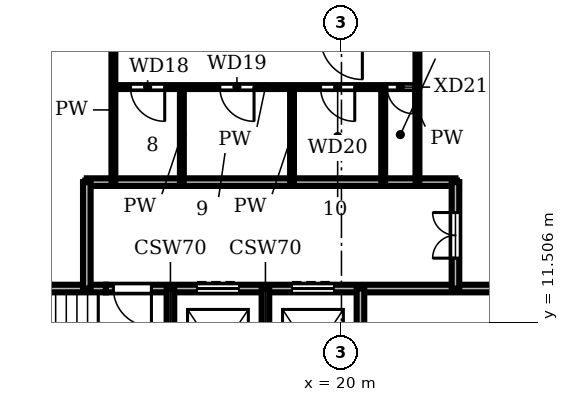
"""IFC4 building model, lengths in metres.
Left out: names, types, materials, properties, quantities, classifications, styles, units other than length and angle.
Written with IfcOpenShell. Run it as: python <this file> out.ifc"""

import sys

from ifc_helpers import new_model, si_unit, direction, frame, frame_2d, origin, place, context, subcontext, project, spatial, rectangle, extrude, element, fill, save


model = new_model("IFC4")
c1 = context("Model", 3, precision=1e-05, world=origin(), true_north=direction((0.0, 1.0)))
c2 = subcontext(c1, "Body", "Model", "MODEL_VIEW")
j1 = project(units=[si_unit("LENGTHUNIT", "METRE"), si_unit("PLANEANGLEUNIT", "RADIAN")], contexts=[c1])
p1 = place(None, origin())
s1 = spatial("IfcSite", under=j1, at=p1, CompositionType="ELEMENT")
p2 = place(p1, origin())
s2 = spatial("IfcBuilding", under=s1, at=p2, CompositionType="ELEMENT")
p3 = place(p2, frame((0.0, 0.0, 166.8)))
s3 = spatial("IfcBuildingStorey", under=s2, at=p3, CompositionType="ELEMENT", Elevation=166.8)
p4 = place(p3, frame((8.7, 12.4, 0.0), z_axis=(0.0, 0.0, 1.0), x_axis=(1.0, 0.0, 0.0)))
e1 = element("IfcWall", 1, at=p4, inside=s3, PredefinedType="SHEAR", context=c2, shape_type="SweptSolid", body=[
    extrude(rectangle(XDim=5.1, YDim=0.2, at=frame_2d((2.55, 0.0))), origin(), (0.0, 0.0, 1.0), 3.58),
])
p5 = place(p3, frame((13.8, 12.4, 0.0), z_axis=(0.0, 0.0, 1.0), x_axis=(1.0, 0.0, 0.0)))
e2 = element("IfcWall", 2, at=p5, inside=s3, PredefinedType="SHEAR", context=c2, shape_type="SweptSolid", body=[
    extrude(rectangle(XDim=13.5, YDim=0.2, at=frame_2d((6.75, 0.0))), origin(), (0.0, 0.0, 1.0), 3.58),
])
p6 = place(p5, frame((2.4, 0.0, 0.0)))
e3 = element("IfcOpeningElement", 3, at=p6, cuts=e2, PredefinedType="OPENING", context=c2, shape_type="SweptSolid", body=[
    extrude(rectangle(XDim=1.1, YDim=2.1, at=frame_2d((0.55, 1.05))), frame((0.0, 0.11, 0.0), z_axis=(0.0, -1.0, 0.0), x_axis=(1.0, 0.0, 0.0)), (0.0, 0.0, 1.0), 0.22),
])
p7 = place(p5, frame((4.9, 0.0, 0.0)))
e4 = element("IfcOpeningElement", 4, at=p7, cuts=e2, PredefinedType="OPENING", context=c2, shape_type="SweptSolid", body=[
    extrude(rectangle(XDim=1.1, YDim=2.1, at=frame_2d((0.55, 1.05))), frame((0.0, 0.11, 0.0), z_axis=(0.0, -1.0, 0.0), x_axis=(1.0, 0.0, 0.0)), (0.0, 0.0, 1.0), 0.22),
])
p8 = place(p5, frame((0.2, 0.0, 0.0)))
e5 = element("IfcOpeningElement", 5, at=p8, cuts=e2, PredefinedType="OPENING", context=c2, shape_type="SweptSolid", body=[
    extrude(rectangle(XDim=1.0, YDim=2.1, at=frame_2d((0.5, 1.05))), frame((0.0, 0.11, 0.0), z_axis=(0.0, -1.0, 0.0), x_axis=(1.0, 0.0, 0.0)), (0.0, 0.0, 1.0), 0.22),
])
p9 = place(p3, frame((13.3, 15.2, 0.0), z_axis=(0.0, 0.0, 1.0), x_axis=(1.0, 0.0, 0.0)))
e6 = element("IfcWall", 6, at=p9, inside=s3, PredefinedType="SHEAR", context=c2, shape_type="SweptSolid", body=[
    extrude(rectangle(XDim=9.7, YDim=0.2, at=frame_2d((4.85, 0.0))), origin(), (0.0, 0.0, 1.0), 3.58),
])
p10 = place(p3, frame((14.0, 17.7, 0.0), z_axis=(0.0, 0.0, 1.0), x_axis=(1.0, 0.0, 0.0)))
e7 = element("IfcWall", 7, at=p10, inside=s3, PredefinedType="PARTITIONING", context=c2, shape_type="SweptSolid", body=[
    extrude(rectangle(XDim=8.0, YDim=0.1, at=frame_2d((4.0, 0.0))), origin(), (0.0, 0.0, 1.0), 3.58),
])
p11 = place(p10, frame((0.45, 0.0, 0.0)))
e8 = element("IfcOpeningElement", 8, at=p11, cuts=e7, PredefinedType="OPENING", context=c2, shape_type="SweptSolid", body=[
    extrude(rectangle(XDim=0.9, YDim=2.1, at=frame_2d((0.45, 1.05))), frame((0.0, 0.06, 0.0), z_axis=(0.0, -1.0, 0.0), x_axis=(1.0, 0.0, 0.0)), (0.0, 0.0, 1.0), 0.12),
])
p12 = place(p10, frame((2.8, 0.0, 0.0)))
e9 = element("IfcOpeningElement", 9, at=p12, cuts=e7, PredefinedType="OPENING", context=c2, shape_type="SweptSolid", body=[
    extrude(rectangle(XDim=0.9, YDim=2.1, at=frame_2d((0.45, 1.05))), frame((0.0, 0.06, 0.0), z_axis=(0.0, -1.0, 0.0), x_axis=(1.0, 0.0, 0.0)), (0.0, 0.0, 1.0), 0.12),
])
p13 = place(p10, frame((5.45, 0.0, 0.0)))
e10 = element("IfcOpeningElement", 10, at=p13, cuts=e7, PredefinedType="OPENING", context=c2, shape_type="SweptSolid", body=[
    extrude(rectangle(XDim=0.9, YDim=2.1, at=frame_2d((0.45, 1.05))), frame((0.0, 0.06, 0.0), z_axis=(0.0, -1.0, 0.0), x_axis=(1.0, 0.0, 0.0)), (0.0, 0.0, 1.0), 0.12),
])
p14 = place(p10, frame((7.2, 0.0, 0.0)))
e11 = element("IfcOpeningElement", 11, at=p14, cuts=e7, PredefinedType="OPENING", context=c2, shape_type="SweptSolid", body=[
    extrude(rectangle(XDim=0.7, YDim=2.1, at=frame_2d((0.35, 1.05))), frame((0.0, 0.06, 0.0), z_axis=(0.0, -1.0, 0.0), x_axis=(1.0, 0.0, 0.0)), (0.0, 0.0, 1.0), 0.12),
])
p15 = place(p3, frame((13.3, 12.4, 0.0), z_axis=(0.0, 0.0, 1.0), x_axis=(0.0, 1.0, 0.0)))
e12 = element("IfcWall", 12, at=p15, inside=s3, PredefinedType="SHEAR", context=c2, shape_type="SweptSolid", body=[
    extrude(rectangle(XDim=2.8, YDim=0.2, at=frame_2d((1.4, 0.0))), origin(), (0.0, 0.0, 1.0), 3.58),
])
p16 = place(p3, frame((14.0, 15.2, 0.0), z_axis=(0.0, 0.0, 1.0), x_axis=(0.0, 1.0, 0.0)))
e13 = element("IfcWall", 13, at=p16, inside=s3, PredefinedType="PARTITIONING", context=c2, shape_type="SweptSolid", body=[
    extrude(rectangle(XDim=3.8, YDim=0.1, at=frame_2d((1.9, 0.0))), origin(), (0.0, 0.0, 1.0), 3.58),
])
p17 = place(p3, frame((15.5, 8.7, 0.0), z_axis=(0.0, 0.0, 1.0), x_axis=(0.0, 1.0, 0.0)))
e14 = element("IfcWall", 14, at=p17, inside=s3, PredefinedType="SHEAR", context=c2, shape_type="SweptSolid", body=[
    extrude(rectangle(XDim=3.7, YDim=0.2, at=frame_2d((1.85, 0.0))), origin(), (0.0, 0.0, 1.0), 3.58),
])
p18 = place(p3, frame((15.8, 15.2, 0.0), z_axis=(0.0, 0.0, 1.0), x_axis=(0.0, 1.0, 0.0)))
e15 = element("IfcWall", 15, at=p18, inside=s3, PredefinedType="PARTITIONING", context=c2, shape_type="SweptSolid", body=[
    extrude(rectangle(XDim=2.5, YDim=0.1, at=frame_2d((1.25, 0.0))), origin(), (0.0, 0.0, 1.0), 3.58),
])
p19 = place(p3, frame((18.0, 8.7, 0.0), z_axis=(0.0, 0.0, 1.0), x_axis=(0.0, 1.0, 0.0)))
e16 = element("IfcWall", 16, at=p19, inside=s3, PredefinedType="SHEAR", context=c2, shape_type="SweptSolid", body=[
    extrude(rectangle(XDim=3.7, YDim=0.2, at=frame_2d((1.85, 0.0))), origin(), (0.0, 0.0, 1.0), 3.58),
])
p20 = place(p3, frame((18.7, 15.2, 0.0), z_axis=(0.0, 0.0, 1.0), x_axis=(0.0, 1.0, 0.0)))
e17 = element("IfcWall", 17, at=p20, inside=s3, PredefinedType="PARTITIONING", context=c2, shape_type="SweptSolid", body=[
    extrude(rectangle(XDim=2.5, YDim=0.1, at=frame_2d((1.25, 0.0))), origin(), (0.0, 0.0, 1.0), 3.58),
])
p21 = place(p3, frame((20.5, 8.7, 0.0), z_axis=(0.0, 0.0, 1.0), x_axis=(0.0, 1.0, 0.0)))
e18 = element("IfcWall", 18, at=p21, inside=s3, PredefinedType="SHEAR", context=c2, shape_type="SweptSolid", body=[
    extrude(rectangle(XDim=3.7, YDim=0.2, at=frame_2d((1.85, 0.0))), origin(), (0.0, 0.0, 1.0), 3.58),
])
p22 = place(p3, frame((21.1, 15.2, 0.0), z_axis=(0.0, 0.0, 1.0), x_axis=(0.0, 1.0, 0.0)))
e19 = element("IfcWall", 19, at=p22, inside=s3, PredefinedType="PARTITIONING", context=c2, shape_type="SweptSolid", body=[
    extrude(rectangle(XDim=2.5, YDim=0.1, at=frame_2d((1.25, 0.0))), origin(), (0.0, 0.0, 1.0), 3.58),
])
p23 = place(p3, frame((22.0, 15.2, 0.0), z_axis=(0.0, 0.0, 1.0), x_axis=(0.0, 1.0, 0.0)))
e20 = element("IfcWall", 20, at=p23, inside=s3, PredefinedType="PARTITIONING", context=c2, shape_type="SweptSolid", body=[
    extrude(rectangle(XDim=3.8, YDim=0.1, at=frame_2d((1.9, 0.0))), origin(), (0.0, 0.0, 1.0), 3.58),
])
p24 = place(p3, frame((23.0, 12.4, 0.0), z_axis=(0.0, 0.0, 1.0), x_axis=(0.0, 1.0, 0.0)))
e21 = element("IfcWall", 21, at=p24, inside=s3, PredefinedType="SHEAR", context=c2, shape_type="SweptSolid", body=[
    extrude(rectangle(XDim=2.8, YDim=0.2, at=frame_2d((1.4, 0.0))), origin(), (0.0, 0.0, 1.0), 3.58),
])
p25 = place(p24, frame((0.8, 0.0, 0.0)))
e22 = element("IfcOpeningElement", 22, at=p25, cuts=e21, PredefinedType="OPENING", context=c2, shape_type="SweptSolid", body=[
    extrude(rectangle(XDim=1.2, YDim=2.1, at=frame_2d((0.6, 1.05))), frame((0.0, 0.11, 0.0), z_axis=(0.0, -1.0, 0.0), x_axis=(1.0, 0.0, 0.0)), (0.0, 0.0, 1.0), 0.22),
])
p26 = place(p6, origin())
e23 = element("IfcDoor", 23, at=p26, inside=s3, OperationType="DOUBLE_DOOR_SLIDING", PredefinedType="DOOR", context=c2, shape_type="SweptSolid", body=[
    extrude(rectangle(XDim=1.1, YDim=2.1, at=frame_2d((0.55, 1.05))), frame((0.0, 0.025, 0.0), z_axis=(0.0, -1.0, 0.0), x_axis=(1.0, 0.0, 0.0)), (0.0, 0.0, 1.0), 0.05),
])
fill(e3, e23)
p27 = place(p7, origin())
e24 = element("IfcDoor", 24, at=p27, inside=s3, OperationType="DOUBLE_DOOR_SLIDING", PredefinedType="DOOR", context=c2, shape_type="SweptSolid", body=[
    extrude(rectangle(XDim=1.1, YDim=2.1, at=frame_2d((0.55, 1.05))), frame((0.0, 0.025, 0.0), z_axis=(0.0, -1.0, 0.0), x_axis=(1.0, 0.0, 0.0)), (0.0, 0.0, 1.0), 0.05),
])
fill(e4, e24)
p28 = place(p8, frame((1.0, 0.0, 0.0), z_axis=(0.0, 0.0, 1.0), x_axis=(-1.0, 0.0, 0.0)))
e25 = element("IfcDoor", 25, at=p28, inside=s3, OperationType="SINGLE_SWING_LEFT", PredefinedType="DOOR", context=c2, shape_type="SweptSolid", body=[
    extrude(rectangle(XDim=1.0, YDim=2.1, at=frame_2d((0.5, 1.05))), frame((0.0, 0.025, 0.0), z_axis=(0.0, -1.0, 0.0), x_axis=(1.0, 0.0, 0.0)), (0.0, 0.0, 1.0), 0.05),
])
fill(e5, e25)
p29 = place(p25, origin())
e26 = element("IfcDoor", 26, at=p29, inside=s3, OperationType="DOUBLE_DOOR_SINGLE_SWING", PredefinedType="DOOR", context=c2, shape_type="SweptSolid", body=[
    extrude(rectangle(XDim=1.2, YDim=2.1, at=frame_2d((0.6, 1.05))), frame((0.0, 0.025, 0.0), z_axis=(0.0, -1.0, 0.0), x_axis=(1.0, 0.0, 0.0)), (0.0, 0.0, 1.0), 0.05),
])
fill(e22, e26)
p30 = place(p11, frame((0.9, 0.0, 0.0), z_axis=(0.0, 0.0, 1.0), x_axis=(-1.0, 0.0, 0.0)))
e27 = element("IfcDoor", 27, at=p30, inside=s3, OperationType="SINGLE_SWING_LEFT", PredefinedType="DOOR", context=c2, shape_type="SweptSolid", body=[
    extrude(rectangle(XDim=0.9, YDim=2.1, at=frame_2d((0.45, 1.05))), frame((0.0, 0.025, 0.0), z_axis=(0.0, -1.0, 0.0), x_axis=(1.0, 0.0, 0.0)), (0.0, 0.0, 1.0), 0.05),
])
fill(e8, e27)
p31 = place(p12, frame((0.9, 0.0, 0.0), z_axis=(0.0, 0.0, 1.0), x_axis=(-1.0, 0.0, 0.0)))
e28 = element("IfcDoor", 28, at=p31, inside=s3, OperationType="SINGLE_SWING_LEFT", PredefinedType="DOOR", context=c2, shape_type="SweptSolid", body=[
    extrude(rectangle(XDim=0.9, YDim=2.1, at=frame_2d((0.45, 1.05))), frame((0.0, 0.025, 0.0), z_axis=(0.0, -1.0, 0.0), x_axis=(1.0, 0.0, 0.0)), (0.0, 0.0, 1.0), 0.05),
])
fill(e9, e28)
p32 = place(p13, frame((0.9, 0.0, 0.0), z_axis=(0.0, 0.0, 1.0), x_axis=(-1.0, 0.0, 0.0)))
e29 = element("IfcDoor", 29, at=p32, inside=s3, OperationType="SINGLE_SWING_LEFT", PredefinedType="DOOR", context=c2, shape_type="SweptSolid", body=[
    extrude(rectangle(XDim=0.9, YDim=2.1, at=frame_2d((0.45, 1.05))), frame((0.0, 0.025, 0.0), z_axis=(0.0, -1.0, 0.0), x_axis=(1.0, 0.0, 0.0)), (0.0, 0.0, 1.0), 0.05),
])
fill(e10, e29)
p33 = place(p14, frame((0.7, 0.0, 0.0), z_axis=(0.0, 0.0, 1.0), x_axis=(-1.0, 0.0, 0.0)))
e30 = element("IfcDoor", 30, at=p33, inside=s3, OperationType="SINGLE_SWING_LEFT", PredefinedType="DOOR", context=c2, shape_type="SweptSolid", body=[
    extrude(rectangle(XDim=0.7, YDim=2.1, at=frame_2d((0.35, 1.05))), frame((0.0, 0.025, 0.0), z_axis=(0.0, -1.0, 0.0), x_axis=(1.0, 0.0, 0.0)), (0.0, 0.0, 1.0), 0.05),
])
fill(e11, e30)
save(model, sys.argv[1])
